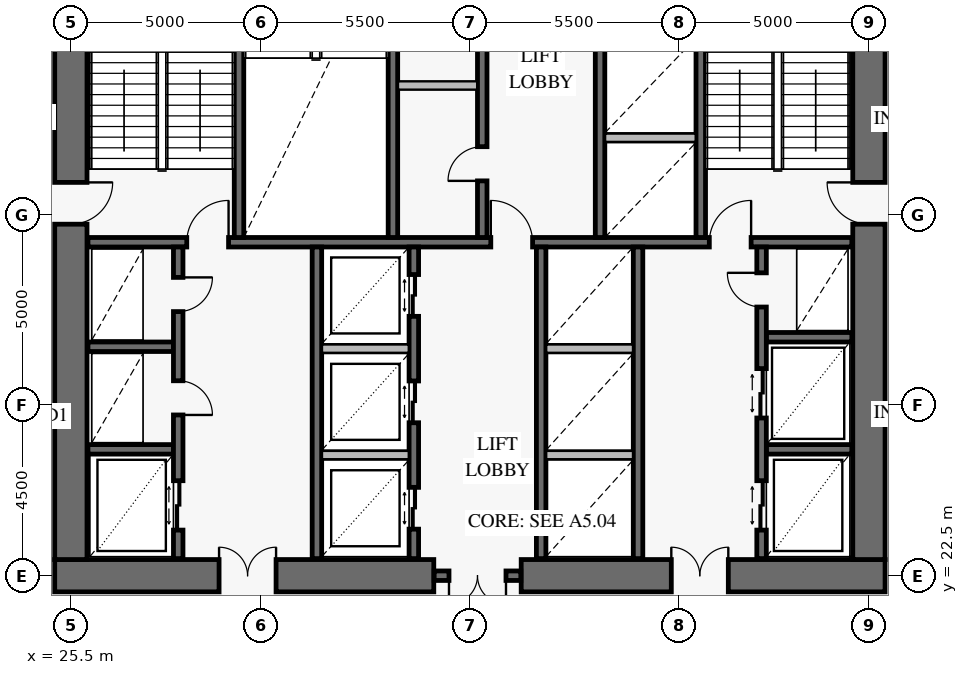
"""IFC4 building model, lengths in metres.
Left out: names, types, materials, properties, quantities, classifications, styles, units other than length and angle.
Written with IfcOpenShell. Run it as: python <this file> out.ifc"""

import sys

from ifc_helpers import new_model, si_unit, direction, frame, frame_2d, origin, place, context, subcontext, project, spatial, rectangle, extrude, element, fill, save


model = new_model("IFC4")
c1 = context("Model", 3, precision=1e-05, world=origin(), true_north=direction((0.0, 1.0)))
c2 = subcontext(c1, "Body", "Model", "MODEL_VIEW")
j1 = project(units=[si_unit("LENGTHUNIT", "METRE"), si_unit("PLANEANGLEUNIT", "RADIAN")], contexts=[c1])
p1 = place(None, origin())
s1 = spatial("IfcSite", under=j1, at=p1, CompositionType="ELEMENT")
p2 = place(p1, origin())
s2 = spatial("IfcBuilding", under=s1, at=p2, CompositionType="ELEMENT")
p3 = place(p2, frame((0.0, 0.0, 79.2)))
s3 = spatial("IfcBuildingStorey", under=s2, at=p3, CompositionType="ELEMENT", Elevation=79.2)
p4 = place(p3, frame((25.075, 22.5, 0.0), z_axis=(0.0, 0.0, 1.0), x_axis=(1.0, 0.0, 0.0)))
e1 = element("IfcWall", 1, at=p4, inside=s3, PredefinedType="SHEAR", context=c2, shape_type="SweptSolid", body=[
    extrude(rectangle(XDim=9.975, YDim=0.85, at=frame_2d((4.988, 0.0))), origin(), (0.0, 0.0, 1.0), 4.2),
])
p5 = place(p4, frame((4.325, 0.0, 0.0)))
e2 = element("IfcOpeningElement", 2, at=p5, cuts=e1, PredefinedType="OPENING", context=c2, shape_type="SweptSolid", body=[
    extrude(rectangle(XDim=1.5, YDim=2.15, at=frame_2d((0.75, 1.075))), frame((0.0, 0.437, 0.0), z_axis=(0.0, -1.0, 0.0), x_axis=(1.0, 0.0, 0.0)), (0.0, 0.0, 1.0), 0.874),
])
p6 = place(p3, frame((37.35, 22.5, 0.0), z_axis=(0.0, 0.0, 1.0), x_axis=(1.0, 0.0, 0.0)))
e3 = element("IfcWall", 3, at=p6, inside=s3, PredefinedType="SHEAR", context=c2, shape_type="SweptSolid", body=[
    extrude(rectangle(XDim=9.575, YDim=0.85, at=frame_2d((4.788, 0.0))), origin(), (0.0, 0.0, 1.0), 4.2),
])
p7 = place(p6, frame((3.95, 0.0, 0.0)))
e4 = element("IfcOpeningElement", 4, at=p7, cuts=e3, PredefinedType="OPENING", context=c2, shape_type="SweptSolid", body=[
    extrude(rectangle(XDim=1.5, YDim=2.15, at=frame_2d((0.75, 1.075))), frame((0.0, 0.437, 0.0), z_axis=(0.0, -1.0, 0.0), x_axis=(1.0, 0.0, 0.0)), (0.0, 0.0, 1.0), 0.874),
])
p8 = place(p3, frame((25.5, 22.925, 0.0), z_axis=(0.0, 0.0, 1.0), x_axis=(0.0, 1.0, 0.0)))
e5 = element("IfcWall", 5, at=p8, inside=s3, PredefinedType="SHEAR", context=c2, shape_type="SweptSolid", body=[
    extrude(rectangle(XDim=18.15, YDim=0.85, at=frame_2d((9.075, 0.0))), origin(), (0.0, 0.0, 1.0), 4.2),
])
p9 = place(p8, frame((8.825, 0.0, 0.0)))
e6 = element("IfcOpeningElement", 6, at=p9, cuts=e5, PredefinedType="OPENING", context=c2, shape_type="SweptSolid", body=[
    extrude(rectangle(XDim=1.1, YDim=2.15, at=frame_2d((0.55, 1.075))), frame((0.0, 0.437, 0.0), z_axis=(0.0, -1.0, 0.0), x_axis=(1.0, 0.0, 0.0)), (0.0, 0.0, 1.0), 0.874),
])
p10 = place(p3, frame((46.5, 22.925, 0.0), z_axis=(0.0, 0.0, 1.0), x_axis=(0.0, 1.0, 0.0)))
e7 = element("IfcWall", 7, at=p10, inside=s3, PredefinedType="SHEAR", context=c2, shape_type="SweptSolid", body=[
    extrude(rectangle(XDim=18.15, YDim=0.85, at=frame_2d((9.075, 0.0))), origin(), (0.0, 0.0, 1.0), 4.2),
])
p11 = place(p10, frame((8.825, 0.0, 0.0)))
e8 = element("IfcOpeningElement", 8, at=p11, cuts=e7, PredefinedType="OPENING", context=c2, shape_type="SweptSolid", body=[
    extrude(rectangle(XDim=1.1, YDim=2.15, at=frame_2d((0.55, 1.075))), frame((0.0, 0.437, 0.0), z_axis=(0.0, -1.0, 0.0), x_axis=(1.0, 0.0, 0.0)), (0.0, 0.0, 1.0), 0.874),
])
p12 = place(p3, frame((35.06, 22.5, 0.0), z_axis=(0.0, 0.0, 1.0), x_axis=(1.0, 0.0, 0.0)))
e9 = element("IfcWall", 9, at=p12, inside=s3, PredefinedType="SOLIDWALL", context=c2, shape_type="SweptSolid", body=[
    extrude(rectangle(XDim=2.28, YDim=0.25, at=frame_2d((1.14, 0.0))), origin(), (0.0, 0.0, 1.0), 4.2),
])
p13 = place(p12, frame((0.39, 0.0, 0.0)))
e10 = element("IfcOpeningElement", 10, at=p13, cuts=e9, PredefinedType="OPENING", context=c2, shape_type="SweptSolid", body=[
    extrude(rectangle(XDim=1.5, YDim=2.15, at=frame_2d((0.75, 1.075))), frame((0.0, 0.137, 0.0), z_axis=(0.0, -1.0, 0.0), x_axis=(1.0, 0.0, 0.0)), (0.0, 0.0, 1.0), 0.274),
])
p14 = place(p3, frame((25.95, 31.275, 0.0), z_axis=(0.0, 0.0, 1.0), x_axis=(1.0, 0.0, 0.0)))
e11 = element("IfcWall", 11, at=p14, inside=s3, PredefinedType="SOLIDWALL", context=c2, shape_type="SweptSolid", body=[
    extrude(rectangle(XDim=20.1, YDim=0.25, at=frame_2d((10.05, 0.0))), origin(), (0.0, 0.0, 1.0), 4.2),
])
p15 = place(p14, frame((2.6, 0.0, 0.0)))
e12 = element("IfcOpeningElement", 12, at=p15, cuts=e11, PredefinedType="OPENING", context=c2, shape_type="SweptSolid", body=[
    extrude(rectangle(XDim=1.1, YDim=2.15, at=frame_2d((0.55, 1.075))), frame((0.0, 0.137, 0.0), z_axis=(0.0, -1.0, 0.0), x_axis=(1.0, 0.0, 0.0)), (0.0, 0.0, 1.0), 0.274),
])
p16 = place(p14, frame((10.6, 0.0, 0.0)))
e13 = element("IfcOpeningElement", 13, at=p16, cuts=e11, PredefinedType="OPENING", context=c2, shape_type="SweptSolid", body=[
    extrude(rectangle(XDim=1.1, YDim=2.15, at=frame_2d((0.55, 1.075))), frame((0.0, 0.137, 0.0), z_axis=(0.0, -1.0, 0.0), x_axis=(1.0, 0.0, 0.0)), (0.0, 0.0, 1.0), 0.274),
])
p17 = place(p14, frame((16.35, 0.0, 0.0)))
e14 = element("IfcOpeningElement", 14, at=p17, cuts=e11, PredefinedType="OPENING", context=c2, shape_type="SweptSolid", body=[
    extrude(rectangle(XDim=1.1, YDim=2.15, at=frame_2d((0.55, 1.075))), frame((0.0, 0.137, 0.0), z_axis=(0.0, -1.0, 0.0), x_axis=(1.0, 0.0, 0.0)), (0.0, 0.0, 1.0), 0.274),
])
for number, where, z_axis, x_axis in (
    (15, (29.925, 31.4, 0.0), (0.0, 0.0, 1.0), (0.0, 1.0, 0.0)),
    (16, (33.975, 31.4, 0.0), (0.0, 0.0, 1.0), (0.0, 1.0, 0.0)),
    (17, (42.075, 31.4, 0.0), (0.0, 0.0, 1.0), (0.0, 1.0, 0.0)),
):
    element("IfcWall", number, at=place(p3, frame(where, z_axis=z_axis, x_axis=x_axis)), inside=s3, PredefinedType="SOLIDWALL", context=c2, shape_type="SweptSolid", body=[
        extrude(rectangle(XDim=9.7, YDim=0.25, at=frame_2d((4.85, 0.0))), origin(), (0.0, 0.0, 1.0), 4.2),
    ])
p18 = place(p3, frame((36.325, 31.4, 0.0), z_axis=(0.0, 0.0, 1.0), x_axis=(0.0, 1.0, 0.0)))
e18 = element("IfcWall", 18, at=p18, inside=s3, PredefinedType="SOLIDWALL", context=c2, shape_type="SweptSolid", body=[
    extrude(rectangle(XDim=9.65, YDim=0.25, at=frame_2d((4.825, 0.0))), origin(), (0.0, 0.0, 1.0), 4.2),
])
p19 = place(p18, frame((1.49, 0.0, 0.0)))
e19 = element("IfcOpeningElement", 19, at=p19, cuts=e18, PredefinedType="OPENING", context=c2, shape_type="SweptSolid", body=[
    extrude(rectangle(XDim=0.9, YDim=2.1, at=frame_2d((0.45, 1.05))), frame((0.0, 0.137, 0.0), z_axis=(0.0, -1.0, 0.0), x_axis=(1.0, 0.0, 0.0)), (0.0, 0.0, 1.0), 0.274),
])
p20 = place(p18, frame((6.41, 0.0, 0.0)))
e20 = element("IfcOpeningElement", 20, at=p20, cuts=e18, PredefinedType="OPENING", context=c2, shape_type="SweptSolid", body=[
    extrude(rectangle(XDim=0.9, YDim=2.1, at=frame_2d((0.45, 1.05))), frame((0.0, 0.137, 0.0), z_axis=(0.0, -1.0, 0.0), x_axis=(1.0, 0.0, 0.0)), (0.0, 0.0, 1.0), 0.274),
])
p21 = place(p3, frame((39.425, 31.4, 0.0), z_axis=(0.0, 0.0, 1.0), x_axis=(0.0, 1.0, 0.0)))
e21 = element("IfcWall", 21, at=p21, inside=s3, PredefinedType="SOLIDWALL", context=c2, shape_type="SweptSolid", body=[
    extrude(rectangle(XDim=9.65, YDim=0.25, at=frame_2d((4.825, 0.0))), origin(), (0.0, 0.0, 1.0), 4.2),
])
p22 = place(p21, frame((8.47, 0.0, 0.0)))
e22 = element("IfcOpeningElement", 22, at=p22, cuts=e21, PredefinedType="OPENING", context=c2, shape_type="SweptSolid", body=[
    extrude(rectangle(XDim=0.9, YDim=2.1, at=frame_2d((0.45, 1.05))), frame((0.0, 0.137, 0.0), z_axis=(0.0, -1.0, 0.0), x_axis=(1.0, 0.0, 0.0)), (0.0, 0.0, 1.0), 0.274),
])
for number, where, z_axis, x_axis in (
    (23, (25.95, 25.825, 0.0), (0.0, 0.0, 1.0), (1.0, 0.0, 0.0)),
    (24, (25.95, 28.525, 0.0), (0.0, 0.0, 1.0), (1.0, 0.0, 0.0)),
):
    element("IfcWall", number, at=place(p3, frame(where, z_axis=z_axis, x_axis=x_axis)), inside=s3, PredefinedType="SOLIDWALL", context=c2, shape_type="SweptSolid", body=[
        extrude(rectangle(XDim=2.25, YDim=0.25, at=frame_2d((1.125, 0.0))), origin(), (0.0, 0.0, 1.0), 4.2),
    ])
p23 = place(p3, frame((28.325, 22.95, 0.0), z_axis=(0.0, 0.0, 1.0), x_axis=(0.0, 1.0, 0.0)))
e25 = element("IfcWall", 25, at=p23, inside=s3, PredefinedType="SOLIDWALL", context=c2, shape_type="SweptSolid", body=[
    extrude(rectangle(XDim=8.2, YDim=0.25, at=frame_2d((4.1, 0.0))), origin(), (0.0, 0.0, 1.0), 4.2),
])
p24 = place(p23, frame((0.75, 0.0, 0.0)))
e26 = element("IfcOpeningElement", 26, at=p24, cuts=e25, PredefinedType="OPENING", context=c2, shape_type="SweptSolid", body=[
    extrude(rectangle(XDim=1.3, YDim=2.3, at=frame_2d((0.65, 1.15))), frame((0.0, 0.137, 0.0), z_axis=(0.0, -1.0, 0.0), x_axis=(1.0, 0.0, 0.0)), (0.0, 0.0, 1.0), 0.274),
])
p25 = place(p23, frame((3.78, 0.0, 0.0)))
e27 = element("IfcOpeningElement", 27, at=p25, cuts=e25, PredefinedType="OPENING", context=c2, shape_type="SweptSolid", body=[
    extrude(rectangle(XDim=0.9, YDim=2.1, at=frame_2d((0.45, 1.05))), frame((0.0, 0.137, 0.0), z_axis=(0.0, -1.0, 0.0), x_axis=(1.0, 0.0, 0.0)), (0.0, 0.0, 1.0), 0.274),
])
p26 = place(p23, frame((6.5, 0.0, 0.0)))
e28 = element("IfcOpeningElement", 28, at=p26, cuts=e25, PredefinedType="OPENING", context=c2, shape_type="SweptSolid", body=[
    extrude(rectangle(XDim=0.9, YDim=2.1, at=frame_2d((0.45, 1.05))), frame((0.0, 0.137, 0.0), z_axis=(0.0, -1.0, 0.0), x_axis=(1.0, 0.0, 0.0)), (0.0, 0.0, 1.0), 0.274),
])
p27 = place(p3, frame((31.975, 22.95, 0.0), z_axis=(0.0, 0.0, 1.0), x_axis=(0.0, 1.0, 0.0)))
e29 = element("IfcWall", 29, at=p27, inside=s3, PredefinedType="SOLIDWALL", context=c2, shape_type="SweptSolid", body=[
    extrude(rectangle(XDim=8.2, YDim=0.25, at=frame_2d((4.1, 0.0))), origin(), (0.0, 0.0, 1.0), 4.2),
])
p28 = place(p3, frame((34.525, 22.95, 0.0), z_axis=(0.0, 0.0, 1.0), x_axis=(0.0, 1.0, 0.0)))
e30 = element("IfcWall", 30, at=p28, inside=s3, PredefinedType="SOLIDWALL", context=c2, shape_type="SweptSolid", body=[
    extrude(rectangle(XDim=8.2, YDim=0.25, at=frame_2d((4.1, 0.0))), origin(), (0.0, 0.0, 1.0), 4.2),
])
p29 = place(p28, frame((0.775, 0.0, 0.0)))
e31 = element("IfcOpeningElement", 31, at=p29, cuts=e30, PredefinedType="OPENING", context=c2, shape_type="SweptSolid", body=[
    extrude(rectangle(XDim=1.1, YDim=2.2, at=frame_2d((0.55, 1.1))), frame((0.0, 0.137, 0.0), z_axis=(0.0, -1.0, 0.0), x_axis=(1.0, 0.0, 0.0)), (0.0, 0.0, 1.0), 0.274),
])
p30 = place(p28, frame((3.575, 0.0, 0.0)))
e32 = element("IfcOpeningElement", 32, at=p30, cuts=e30, PredefinedType="OPENING", context=c2, shape_type="SweptSolid", body=[
    extrude(rectangle(XDim=1.1, YDim=2.2, at=frame_2d((0.55, 1.1))), frame((0.0, 0.137, 0.0), z_axis=(0.0, -1.0, 0.0), x_axis=(1.0, 0.0, 0.0)), (0.0, 0.0, 1.0), 0.274),
])
p31 = place(p28, frame((6.375, 0.0, 0.0)))
e33 = element("IfcOpeningElement", 33, at=p31, cuts=e30, PredefinedType="OPENING", context=c2, shape_type="SweptSolid", body=[
    extrude(rectangle(XDim=1.1, YDim=2.2, at=frame_2d((0.55, 1.1))), frame((0.0, 0.137, 0.0), z_axis=(0.0, -1.0, 0.0), x_axis=(1.0, 0.0, 0.0)), (0.0, 0.0, 1.0), 0.274),
])
for number, where, z_axis, x_axis in (
    (34, (37.875, 22.95, 0.0), (0.0, 0.0, 1.0), (0.0, 1.0, 0.0)),
    (35, (40.425, 22.95, 0.0), (0.0, 0.0, 1.0), (0.0, 1.0, 0.0)),
):
    element("IfcWall", number, at=place(p3, frame(where, z_axis=z_axis, x_axis=x_axis)), inside=s3, PredefinedType="SOLIDWALL", context=c2, shape_type="SweptSolid", body=[
        extrude(rectangle(XDim=8.2, YDim=0.25, at=frame_2d((4.1, 0.0))), origin(), (0.0, 0.0, 1.0), 4.2),
    ])
for number, where, z_axis, x_axis in (
    (36, (43.8, 25.825, 0.0), (0.0, 0.0, 1.0), (1.0, 0.0, 0.0)),
    (37, (43.8, 28.775, 0.0), (0.0, 0.0, 1.0), (1.0, 0.0, 0.0)),
):
    element("IfcWall", number, at=place(p3, frame(where, z_axis=z_axis, x_axis=x_axis)), inside=s3, PredefinedType="SOLIDWALL", context=c2, shape_type="SweptSolid", body=[
        extrude(rectangle(XDim=2.25, YDim=0.25, at=frame_2d((1.125, 0.0))), origin(), (0.0, 0.0, 1.0), 4.2),
    ])
p32 = place(p3, frame((43.675, 22.95, 0.0), z_axis=(0.0, 0.0, 1.0), x_axis=(0.0, 1.0, 0.0)))
e38 = element("IfcWall", 38, at=p32, inside=s3, PredefinedType="SOLIDWALL", context=c2, shape_type="SweptSolid", body=[
    extrude(rectangle(XDim=8.2, YDim=0.25, at=frame_2d((4.1, 0.0))), origin(), (0.0, 0.0, 1.0), 4.2),
])
p33 = place(p32, frame((0.75, 0.0, 0.0)))
e39 = element("IfcOpeningElement", 39, at=p33, cuts=e38, PredefinedType="OPENING", context=c2, shape_type="SweptSolid", body=[
    extrude(rectangle(XDim=1.3, YDim=2.3, at=frame_2d((0.65, 1.15))), frame((0.0, 0.137, 0.0), z_axis=(0.0, -1.0, 0.0), x_axis=(1.0, 0.0, 0.0)), (0.0, 0.0, 1.0), 0.274),
])
p34 = place(p32, frame((3.7, 0.0, 0.0)))
e40 = element("IfcOpeningElement", 40, at=p34, cuts=e38, PredefinedType="OPENING", context=c2, shape_type="SweptSolid", body=[
    extrude(rectangle(XDim=1.3, YDim=2.3, at=frame_2d((0.65, 1.15))), frame((0.0, 0.137, 0.0), z_axis=(0.0, -1.0, 0.0), x_axis=(1.0, 0.0, 0.0)), (0.0, 0.0, 1.0), 0.274),
])
p35 = place(p32, frame((6.62, 0.0, 0.0)))
e41 = element("IfcOpeningElement", 41, at=p35, cuts=e38, PredefinedType="OPENING", context=c2, shape_type="SweptSolid", body=[
    extrude(rectangle(XDim=0.9, YDim=2.1, at=frame_2d((0.45, 1.05))), frame((0.0, 0.137, 0.0), z_axis=(0.0, -1.0, 0.0), x_axis=(1.0, 0.0, 0.0)), (0.0, 0.0, 1.0), 0.274),
])
p36 = place(p3, frame((34.108, 35.4, 0.0), z_axis=(0.0, 0.0, 1.0), x_axis=(1.0, 0.0, 0.0)))
e42 = element("IfcWall", 42, at=p36, inside=s3, PredefinedType="PARTITIONING", context=c2, shape_type="SweptSolid", body=[
    extrude(rectangle(XDim=2.084, YDim=0.22, at=frame_2d((1.042, 0.0))), origin(), (0.0, 0.0, 1.0), 3.92),
])
p37 = place(p3, frame((39.558, 34.025, 0.0), z_axis=(0.0, 0.0, 1.0), x_axis=(1.0, 0.0, 0.0)))
e43 = element("IfcWall", 43, at=p37, inside=s3, PredefinedType="PARTITIONING", context=c2, shape_type="SweptSolid", body=[
    extrude(rectangle(XDim=2.384, YDim=0.22, at=frame_2d((1.192, 0.0))), origin(), (0.0, 0.0, 1.0), 3.92),
])
for number, where, z_axis, x_axis in (
    (44, (32.108, 25.675, 0.0), (0.0, 0.0, 1.0), (1.0, 0.0, 0.0)),
    (45, (32.108, 28.475, 0.0), (0.0, 0.0, 1.0), (1.0, 0.0, 0.0)),
):
    element("IfcWall", number, at=place(p3, frame(where, z_axis=z_axis, x_axis=x_axis)), inside=s3, PredefinedType="PARTITIONING", context=c2, shape_type="SweptSolid", body=[
        extrude(rectangle(XDim=2.284, YDim=0.22, at=frame_2d((1.142, 0.0))), origin(), (0.0, 0.0, 1.0), 3.92),
    ])
for number, where, z_axis, x_axis in (
    (46, (38.008, 25.675, 0.0), (0.0, 0.0, 1.0), (1.0, 0.0, 0.0)),
    (47, (38.008, 28.475, 0.0), (0.0, 0.0, 1.0), (1.0, 0.0, 0.0)),
):
    element("IfcWall", number, at=place(p3, frame(where, z_axis=z_axis, x_axis=x_axis)), inside=s3, PredefinedType="PARTITIONING", context=c2, shape_type="SweptSolid", body=[
        extrude(rectangle(XDim=2.284, YDim=0.22, at=frame_2d((1.142, 0.0))), origin(), (0.0, 0.0, 1.0), 3.92),
    ])
p38 = place(p9, frame((1.1, 0.0, 0.0), z_axis=(0.0, 0.0, 1.0), x_axis=(-1.0, 0.0, 0.0)))
e48 = element("IfcDoor", 48, at=p38, inside=s3, OperationType="SINGLE_SWING_LEFT", PredefinedType="USERDEFINED", context=c2, shape_type="SweptSolid", body=[
    extrude(rectangle(XDim=1.1, YDim=2.15, at=frame_2d((0.55, 1.075))), frame((0.0, 0.025, 0.0), z_axis=(0.0, -1.0, 0.0), x_axis=(1.0, 0.0, 0.0)), (0.0, 0.0, 1.0), 0.05),
])
fill(e6, e48)
p39 = place(p11, origin())
e49 = element("IfcDoor", 49, at=p39, inside=s3, OperationType="SINGLE_SWING_RIGHT", PredefinedType="USERDEFINED", context=c2, shape_type="SweptSolid", body=[
    extrude(rectangle(XDim=1.1, YDim=2.15, at=frame_2d((0.55, 1.075))), frame((0.0, 0.025, 0.0), z_axis=(0.0, -1.0, 0.0), x_axis=(1.0, 0.0, 0.0)), (0.0, 0.0, 1.0), 0.05),
])
fill(e8, e49)
p40 = place(p5, origin())
e50 = element("IfcDoor", 50, at=p40, inside=s3, OperationType="DOUBLE_DOOR_SINGLE_SWING", PredefinedType="DOOR", context=c2, shape_type="SweptSolid", body=[
    extrude(rectangle(XDim=1.5, YDim=2.15, at=frame_2d((0.75, 1.075))), frame((0.0, 0.025, 0.0), z_axis=(0.0, -1.0, 0.0), x_axis=(1.0, 0.0, 0.0)), (0.0, 0.0, 1.0), 0.05),
])
fill(e2, e50)
p41 = place(p7, origin())
e51 = element("IfcDoor", 51, at=p41, inside=s3, OperationType="DOUBLE_DOOR_SINGLE_SWING", PredefinedType="DOOR", context=c2, shape_type="SweptSolid", body=[
    extrude(rectangle(XDim=1.5, YDim=2.15, at=frame_2d((0.75, 1.075))), frame((0.0, 0.025, 0.0), z_axis=(0.0, -1.0, 0.0), x_axis=(1.0, 0.0, 0.0)), (0.0, 0.0, 1.0), 0.05),
])
fill(e4, e51)
p42 = place(p13, frame((1.5, 0.0, 0.0), z_axis=(0.0, 0.0, 1.0), x_axis=(-1.0, 0.0, 0.0)))
e52 = element("IfcDoor", 52, at=p42, inside=s3, OperationType="DOUBLE_DOOR_SINGLE_SWING", PredefinedType="DOOR", context=c2, shape_type="SweptSolid", body=[
    extrude(rectangle(XDim=1.5, YDim=2.15, at=frame_2d((0.75, 1.075))), frame((0.0, 0.025, 0.0), z_axis=(0.0, -1.0, 0.0), x_axis=(1.0, 0.0, 0.0)), (0.0, 0.0, 1.0), 0.05),
])
fill(e10, e52)
p43 = place(p15, origin())
e53 = element("IfcDoor", 53, at=p43, inside=s3, OperationType="SINGLE_SWING_RIGHT", PredefinedType="USERDEFINED", context=c2, shape_type="SweptSolid", body=[
    extrude(rectangle(XDim=1.1, YDim=2.15, at=frame_2d((0.55, 1.075))), frame((0.0, 0.025, 0.0), z_axis=(0.0, -1.0, 0.0), x_axis=(1.0, 0.0, 0.0)), (0.0, 0.0, 1.0), 0.05),
])
fill(e12, e53)
p44 = place(p16, origin())
e54 = element("IfcDoor", 54, at=p44, inside=s3, OperationType="SINGLE_SWING_LEFT", PredefinedType="USERDEFINED", context=c2, shape_type="SweptSolid", body=[
    extrude(rectangle(XDim=1.1, YDim=2.15, at=frame_2d((0.55, 1.075))), frame((0.0, 0.025, 0.0), z_axis=(0.0, -1.0, 0.0), x_axis=(1.0, 0.0, 0.0)), (0.0, 0.0, 1.0), 0.05),
])
fill(e13, e54)
p45 = place(p17, origin())
e55 = element("IfcDoor", 55, at=p45, inside=s3, OperationType="SINGLE_SWING_RIGHT", PredefinedType="USERDEFINED", context=c2, shape_type="SweptSolid", body=[
    extrude(rectangle(XDim=1.1, YDim=2.15, at=frame_2d((0.55, 1.075))), frame((0.0, 0.025, 0.0), z_axis=(0.0, -1.0, 0.0), x_axis=(1.0, 0.0, 0.0)), (0.0, 0.0, 1.0), 0.05),
])
fill(e14, e55)
p46 = place(p19, origin())
e56 = element("IfcDoor", 56, at=p46, inside=s3, OperationType="SINGLE_SWING_LEFT", PredefinedType="DOOR", context=c2, shape_type="SweptSolid", body=[
    extrude(rectangle(XDim=0.9, YDim=2.1, at=frame_2d((0.45, 1.05))), frame((0.0, 0.025, 0.0), z_axis=(0.0, -1.0, 0.0), x_axis=(1.0, 0.0, 0.0)), (0.0, 0.0, 1.0), 0.05),
])
fill(e19, e56)
p47 = place(p24, frame((1.3, 0.0, 0.0), z_axis=(0.0, 0.0, 1.0), x_axis=(-1.0, 0.0, 0.0)))
e57 = element("IfcDoor", 57, at=p47, inside=s3, OperationType="DOUBLE_DOOR_SLIDING", PredefinedType="DOOR", context=c2, shape_type="SweptSolid", body=[
    extrude(rectangle(XDim=1.3, YDim=2.3, at=frame_2d((0.65, 1.15))), frame((0.0, 0.025, 0.0), z_axis=(0.0, -1.0, 0.0), x_axis=(1.0, 0.0, 0.0)), (0.0, 0.0, 1.0), 0.05),
])
fill(e26, e57)
p48 = place(p25, frame((0.9, 0.0, 0.0), z_axis=(0.0, 0.0, 1.0), x_axis=(-1.0, 0.0, 0.0)))
e58 = element("IfcDoor", 58, at=p48, inside=s3, OperationType="SINGLE_SWING_RIGHT", PredefinedType="DOOR", context=c2, shape_type="SweptSolid", body=[
    extrude(rectangle(XDim=0.9, YDim=2.1, at=frame_2d((0.45, 1.05))), frame((0.0, 0.025, 0.0), z_axis=(0.0, -1.0, 0.0), x_axis=(1.0, 0.0, 0.0)), (0.0, 0.0, 1.0), 0.05),
])
fill(e27, e58)
p49 = place(p26, frame((0.9, 0.0, 0.0), z_axis=(0.0, 0.0, 1.0), x_axis=(-1.0, 0.0, 0.0)))
e59 = element("IfcDoor", 59, at=p49, inside=s3, OperationType="SINGLE_SWING_LEFT", PredefinedType="DOOR", context=c2, shape_type="SweptSolid", body=[
    extrude(rectangle(XDim=0.9, YDim=2.1, at=frame_2d((0.45, 1.05))), frame((0.0, 0.025, 0.0), z_axis=(0.0, -1.0, 0.0), x_axis=(1.0, 0.0, 0.0)), (0.0, 0.0, 1.0), 0.05),
])
fill(e28, e59)
p50 = place(p29, frame((1.1, 0.0, 0.0), z_axis=(0.0, 0.0, 1.0), x_axis=(-1.0, 0.0, 0.0)))
e60 = element("IfcDoor", 60, at=p50, inside=s3, OperationType="DOUBLE_DOOR_SLIDING", PredefinedType="DOOR", context=c2, shape_type="SweptSolid", body=[
    extrude(rectangle(XDim=1.1, YDim=2.2, at=frame_2d((0.55, 1.1))), frame((0.0, 0.025, 0.0), z_axis=(0.0, -1.0, 0.0), x_axis=(1.0, 0.0, 0.0)), (0.0, 0.0, 1.0), 0.05),
])
fill(e31, e60)
p51 = place(p30, frame((1.1, 0.0, 0.0), z_axis=(0.0, 0.0, 1.0), x_axis=(-1.0, 0.0, 0.0)))
e61 = element("IfcDoor", 61, at=p51, inside=s3, OperationType="DOUBLE_DOOR_SLIDING", PredefinedType="DOOR", context=c2, shape_type="SweptSolid", body=[
    extrude(rectangle(XDim=1.1, YDim=2.2, at=frame_2d((0.55, 1.1))), frame((0.0, 0.025, 0.0), z_axis=(0.0, -1.0, 0.0), x_axis=(1.0, 0.0, 0.0)), (0.0, 0.0, 1.0), 0.05),
])
fill(e32, e61)
p52 = place(p31, frame((1.1, 0.0, 0.0), z_axis=(0.0, 0.0, 1.0), x_axis=(-1.0, 0.0, 0.0)))
e62 = element("IfcDoor", 62, at=p52, inside=s3, OperationType="DOUBLE_DOOR_SLIDING", PredefinedType="DOOR", context=c2, shape_type="SweptSolid", body=[
    extrude(rectangle(XDim=1.1, YDim=2.2, at=frame_2d((0.55, 1.1))), frame((0.0, 0.025, 0.0), z_axis=(0.0, -1.0, 0.0), x_axis=(1.0, 0.0, 0.0)), (0.0, 0.0, 1.0), 0.05),
])
fill(e33, e62)
p53 = place(p33, origin())
e63 = element("IfcDoor", 63, at=p53, inside=s3, OperationType="DOUBLE_DOOR_SLIDING", PredefinedType="DOOR", context=c2, shape_type="SweptSolid", body=[
    extrude(rectangle(XDim=1.3, YDim=2.3, at=frame_2d((0.65, 1.15))), frame((0.0, 0.025, 0.0), z_axis=(0.0, -1.0, 0.0), x_axis=(1.0, 0.0, 0.0)), (0.0, 0.0, 1.0), 0.05),
])
fill(e39, e63)
p54 = place(p34, origin())
e64 = element("IfcDoor", 64, at=p54, inside=s3, OperationType="DOUBLE_DOOR_SLIDING", PredefinedType="DOOR", context=c2, shape_type="SweptSolid", body=[
    extrude(rectangle(XDim=1.3, YDim=2.3, at=frame_2d((0.65, 1.15))), frame((0.0, 0.025, 0.0), z_axis=(0.0, -1.0, 0.0), x_axis=(1.0, 0.0, 0.0)), (0.0, 0.0, 1.0), 0.05),
])
fill(e40, e64)
p55 = place(p35, origin())
e65 = element("IfcDoor", 65, at=p55, inside=s3, OperationType="SINGLE_SWING_RIGHT", PredefinedType="DOOR", context=c2, shape_type="SweptSolid", body=[
    extrude(rectangle(XDim=0.9, YDim=2.1, at=frame_2d((0.45, 1.05))), frame((0.0, 0.025, 0.0), z_axis=(0.0, -1.0, 0.0), x_axis=(1.0, 0.0, 0.0)), (0.0, 0.0, 1.0), 0.05),
])
fill(e41, e65)
save(model, sys.argv[1])
